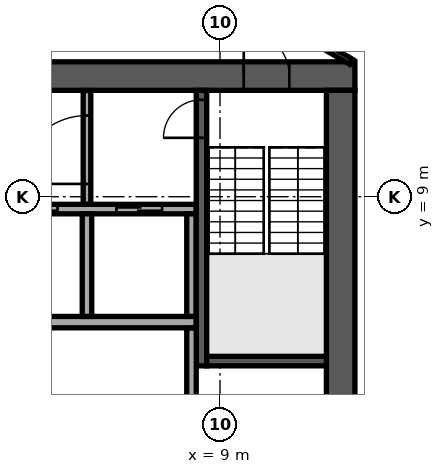
"""IFC4 building model, lengths in metres.
Left out: names, types, materials, properties, quantities, classifications, styles, units other than length and angle.
Written with IfcOpenShell. Run it as: python <this file> out.ifc"""

import sys

from ifc_helpers import new_model, si_unit, direction, frame, frame_2d, origin, place, context, subcontext, project, spatial, rectangle, extrude, element, fill, save


model = new_model("IFC4")
c1 = context("Model", 3, precision=1e-05, world=origin(), true_north=direction((0.0, 1.0)))
c2 = subcontext(c1, "Body", "Model", "MODEL_VIEW")
j1 = project(units=[si_unit("LENGTHUNIT", "METRE"), si_unit("PLANEANGLEUNIT", "RADIAN")], contexts=[c1])
p1 = place(None, origin())
s1 = spatial("IfcSite", under=j1, at=p1, CompositionType="ELEMENT")
p2 = place(p1, origin())
s2 = spatial("IfcBuilding", under=s1, at=p2, CompositionType="ELEMENT")
p3 = place(p2, frame((0.0, 0.0, 262.9)))
s3 = spatial("IfcBuildingStorey", under=s2, at=p3, CompositionType="ELEMENT", Elevation=262.9)
p4 = place(p3, frame((-12.55, 12.175, 0.0), z_axis=(0.0, 0.0, 1.0), x_axis=(1.0, 0.0, 0.0)))
e1 = element("IfcWall", 1, at=p4, inside=s3, PredefinedType="SHEAR", context=c2, shape_type="SweptSolid", body=[
    extrude(rectangle(XDim=25.1, YDim=0.75, at=frame_2d((12.55, 0.0))), origin(), (0.0, 0.0, 1.0), 3.64),
])
p5 = place(p4, frame((11.35, 0.0, 0.0)))
e2 = element("IfcOpeningElement", 2, at=p5, cuts=e1, PredefinedType="OPENING", context=c2, shape_type="SweptSolid", body=[
    extrude(rectangle(XDim=2.4, YDim=2.4, at=frame_2d((1.2, 1.2))), frame((0.0, 0.385, 0.0), z_axis=(0.0, -1.0, 0.0), x_axis=(1.0, 0.0, 0.0)), (0.0, 0.0, 1.0), 0.77),
])
p6 = place(p4, frame((22.175, 0.0, 0.0)))
e3 = element("IfcOpeningElement", 3, at=p6, cuts=e1, PredefinedType="OPENING", context=c2, shape_type="SweptSolid", body=[
    extrude(rectangle(XDim=1.2, YDim=2.1, at=frame_2d((0.6, 1.05))), frame((0.0, 0.385, 0.0), z_axis=(0.0, -1.0, 0.0), x_axis=(1.0, 0.0, 0.0)), (0.0, 0.0, 1.0), 0.77),
])
p7 = place(p4, frame((1.15, 0.0, 0.0)))
e4 = element("IfcOpeningElement", 4, at=p7, cuts=e1, PredefinedType="OPENING", context=c2, shape_type="SweptSolid", body=[
    extrude(rectangle(XDim=1.0, YDim=2.1, at=frame_2d((0.5, 1.05))), frame((0.0, 0.385, 0.0), z_axis=(0.0, -1.0, 0.0), x_axis=(1.0, 0.0, 0.0)), (0.0, 0.0, 1.0), 0.77),
])
p8 = place(p3, frame((12.175, -11.8, 0.0), z_axis=(0.0, 0.0, 1.0), x_axis=(0.0, 1.0, 0.0)))
e5 = element("IfcWall", 5, at=p8, inside=s3, PredefinedType="SHEAR", context=c2, shape_type="SweptSolid", body=[
    extrude(rectangle(XDim=23.6, YDim=0.75, at=frame_2d((11.8, 0.0))), origin(), (0.0, 0.0, 1.0), 3.64),
])
p9 = place(p8, frame((10.6, 0.0, 0.0)))
e6 = element("IfcOpeningElement", 6, at=p9, cuts=e5, PredefinedType="OPENING", context=c2, shape_type="SweptSolid", body=[
    extrude(rectangle(XDim=2.4, YDim=2.4, at=frame_2d((1.2, 1.2))), frame((0.0, 0.385, 0.0), z_axis=(0.0, -1.0, 0.0), x_axis=(1.0, 0.0, 0.0)), (0.0, 0.0, 1.0), 0.77),
])
p10 = place(p3, frame((-8.375, 5.7, 0.0), z_axis=(0.0, 0.0, 1.0), x_axis=(1.0, 0.0, 0.0)))
e7 = element("IfcWall", 7, at=p10, inside=s3, PredefinedType="SOLIDWALL", context=c2, shape_type="SweptSolid", body=[
    extrude(rectangle(XDim=16.75, YDim=0.3, at=frame_2d((8.375, 0.0))), origin(), (0.0, 0.0, 1.0), 3.64),
])
p11 = place(p3, frame((-8.375, 8.675, 0.0), z_axis=(0.0, 0.0, 1.0), x_axis=(1.0, 0.0, 0.0)))
e8 = element("IfcWall", 8, at=p11, inside=s3, PredefinedType="SOLIDWALL", context=c2, shape_type="SweptSolid", body=[
    extrude(rectangle(XDim=16.75, YDim=0.25, at=frame_2d((8.375, 0.0))), origin(), (0.0, 0.0, 1.0), 3.64),
])
p12 = place(p11, frame((0.9, 0.0, 0.0)))
e9 = element("IfcOpeningElement", 9, at=p12, cuts=e8, PredefinedType="OPENING", context=c2, shape_type="SweptSolid", body=[
    extrude(rectangle(XDim=1.2, YDim=2.1, at=frame_2d((0.6, 1.05))), frame((0.0, 0.135, 0.0), z_axis=(0.0, -1.0, 0.0), x_axis=(1.0, 0.0, 0.0)), (0.0, 0.0, 1.0), 0.27),
])
p13 = place(p11, frame((3.65, 0.0, 0.0)))
e10 = element("IfcOpeningElement", 10, at=p13, cuts=e8, PredefinedType="OPENING", context=c2, shape_type="SweptSolid", body=[
    extrude(rectangle(XDim=1.2, YDim=2.1, at=frame_2d((0.6, 1.05))), frame((0.0, 0.135, 0.0), z_axis=(0.0, -1.0, 0.0), x_axis=(1.0, 0.0, 0.0)), (0.0, 0.0, 1.0), 0.27),
])
p14 = place(p11, frame((6.4, 0.0, 0.0)))
e11 = element("IfcOpeningElement", 11, at=p14, cuts=e8, PredefinedType="OPENING", context=c2, shape_type="SweptSolid", body=[
    extrude(rectangle(XDim=1.2, YDim=2.1, at=frame_2d((0.6, 1.05))), frame((0.0, 0.135, 0.0), z_axis=(0.0, -1.0, 0.0), x_axis=(1.0, 0.0, 0.0)), (0.0, 0.0, 1.0), 0.27),
])
p15 = place(p11, frame((9.15, 0.0, 0.0)))
e12 = element("IfcOpeningElement", 12, at=p15, cuts=e8, PredefinedType="OPENING", context=c2, shape_type="SweptSolid", body=[
    extrude(rectangle(XDim=1.2, YDim=2.1, at=frame_2d((0.6, 1.05))), frame((0.0, 0.135, 0.0), z_axis=(0.0, -1.0, 0.0), x_axis=(1.0, 0.0, 0.0)), (0.0, 0.0, 1.0), 0.27),
])
p16 = place(p11, frame((11.9, 0.0, 0.0)))
e13 = element("IfcOpeningElement", 13, at=p16, cuts=e8, PredefinedType="OPENING", context=c2, shape_type="SweptSolid", body=[
    extrude(rectangle(XDim=1.2, YDim=2.1, at=frame_2d((0.6, 1.05))), frame((0.0, 0.135, 0.0), z_axis=(0.0, -1.0, 0.0), x_axis=(1.0, 0.0, 0.0)), (0.0, 0.0, 1.0), 0.27),
])
p17 = place(p11, frame((14.65, 0.0, 0.0)))
e14 = element("IfcOpeningElement", 14, at=p17, cuts=e8, PredefinedType="OPENING", context=c2, shape_type="SweptSolid", body=[
    extrude(rectangle(XDim=1.2, YDim=2.1, at=frame_2d((0.6, 1.05))), frame((0.0, 0.135, 0.0), z_axis=(0.0, -1.0, 0.0), x_axis=(1.0, 0.0, 0.0)), (0.0, 0.0, 1.0), 0.27),
])
for number, where, z_axis, x_axis in (
    (15, (5.5, 5.85, 0.0), (0.0, 0.0, 1.0), (0.0, 1.0, 0.0)),
    (16, (8.25, 5.85, 0.0), (0.0, 0.0, 1.0), (0.0, 1.0, 0.0)),
):
    element("IfcWall", number, at=place(p3, frame(where, z_axis=z_axis, x_axis=x_axis)), inside=s3, PredefinedType="SOLIDWALL", context=c2, shape_type="SweptSolid", body=[
        extrude(rectangle(XDim=2.7, YDim=0.25, at=frame_2d((1.35, 0.0))), origin(), (0.0, 0.0, 1.0), 3.64),
    ])
p18 = place(p3, frame((8.512, 4.55, 0.0), z_axis=(0.0, 0.0, 1.0), x_axis=(0.0, 1.0, 0.0)))
e17 = element("IfcWall", 17, at=p18, inside=s3, PredefinedType="SOLIDWALL", context=c2, shape_type="SweptSolid", body=[
    extrude(rectangle(XDim=7.25, YDim=0.275, at=frame_2d((3.625, 0.0))), origin(), (0.0, 0.0, 1.0), 3.64),
])
p19 = place(p18, frame((6.0, 0.0, 0.0)))
e18 = element("IfcOpeningElement", 18, at=p19, cuts=e17, PredefinedType="OPENING", context=c2, shape_type="SweptSolid", body=[
    extrude(rectangle(XDim=1.0, YDim=2.1, at=frame_2d((0.5, 1.05))), frame((0.0, 0.147, 0.0), z_axis=(0.0, -1.0, 0.0), x_axis=(1.0, 0.0, 0.0)), (0.0, 0.0, 1.0), 0.295),
])
p20 = place(p3, frame((8.65, 4.675, 0.0), z_axis=(0.0, 0.0, 1.0), x_axis=(1.0, 0.0, 0.0)))
e19 = element("IfcWall", 19, at=p20, inside=s3, PredefinedType="SOLIDWALL", context=c2, shape_type="SweptSolid", body=[
    extrude(rectangle(XDim=3.15, YDim=0.25, at=frame_2d((1.575, 0.0))), origin(), (0.0, 0.0, 1.0), 3.64),
])
p21 = place(p3, frame((8.25, 2.855, 0.0), z_axis=(0.0, 0.0, 1.0), x_axis=(0.0, 1.0, 0.0)))
e20 = element("IfcWall", 20, at=p21, inside=s3, PredefinedType="PARTITIONING", context=c2, shape_type="SweptSolid", body=[
    extrude(rectangle(XDim=2.69, YDim=0.25, at=frame_2d((1.345, 0.0))), origin(), (0.0, 0.0, 1.0), 3.64),
])
p22 = place(p3, frame((5.5, 8.805, 0.0), z_axis=(0.0, 0.0, 1.0), x_axis=(0.0, 1.0, 0.0)))
e21 = element("IfcWall", 21, at=p22, inside=s3, PredefinedType="PARTITIONING", context=c2, shape_type="SweptSolid", body=[
    extrude(rectangle(XDim=2.99, YDim=0.2, at=frame_2d((1.495, 0.0))), origin(), (0.0, 0.0, 1.0), 3.64),
])
p23 = place(p22, frame((0.532, 0.0, 0.0)))
e22 = element("IfcOpeningElement", 22, at=p23, cuts=e21, PredefinedType="OPENING", context=c2, shape_type="SweptSolid", body=[
    extrude(rectangle(XDim=1.8, YDim=2.1, at=frame_2d((0.9, 1.05))), frame((0.0, 0.11, 0.0), z_axis=(0.0, -1.0, 0.0), x_axis=(1.0, 0.0, 0.0)), (0.0, 0.0, 1.0), 0.22),
])
p24 = place(p3, frame((8.094, -32.782, 0.0), z_axis=(0.0, 0.0, 1.0), x_axis=(0.499997945818, 0.866026589763, 0.0)))
e23 = element("IfcWall", 23, at=p24, inside=s3, PredefinedType="STANDARD", context=c2, shape_type="SweptSolid", body=[
    extrude(rectangle(XDim=48.686, YDim=0.6, at=frame_2d((24.343, 0.0))), origin(), (0.0, 0.0, 1.0), 3.64),
])
p25 = place(p24, frame((1.213, 0.0, 0.9)))
e24 = element("IfcOpeningElement", 24, at=p25, cuts=e23, PredefinedType="OPENING", context=c2, shape_type="SweptSolid", body=[
    extrude(rectangle(XDim=2.0, YDim=2.1, at=frame_2d((1.0, 1.05))), frame((0.0, 0.31, 0.0), z_axis=(0.0, -1.0, 0.0), x_axis=(1.0, 0.0, 0.0)), (0.0, 0.0, 1.0), 0.62),
])
p26 = place(p24, frame((5.639, 0.0, 0.9)))
e25 = element("IfcOpeningElement", 25, at=p26, cuts=e23, PredefinedType="OPENING", context=c2, shape_type="SweptSolid", body=[
    extrude(rectangle(XDim=2.0, YDim=2.1, at=frame_2d((1.0, 1.05))), frame((0.0, 0.31, 0.0), z_axis=(0.0, -1.0, 0.0), x_axis=(1.0, 0.0, 0.0)), (0.0, 0.0, 1.0), 0.62),
])
p27 = place(p24, frame((10.065, 0.0, 0.9)))
e26 = element("IfcOpeningElement", 26, at=p27, cuts=e23, PredefinedType="OPENING", context=c2, shape_type="SweptSolid", body=[
    extrude(rectangle(XDim=2.0, YDim=2.1, at=frame_2d((1.0, 1.05))), frame((0.0, 0.31, 0.0), z_axis=(0.0, -1.0, 0.0), x_axis=(1.0, 0.0, 0.0)), (0.0, 0.0, 1.0), 0.62),
])
p28 = place(p24, frame((14.491, 0.0, 0.9)))
e27 = element("IfcOpeningElement", 27, at=p28, cuts=e23, PredefinedType="OPENING", context=c2, shape_type="SweptSolid", body=[
    extrude(rectangle(XDim=2.0, YDim=2.1, at=frame_2d((1.0, 1.05))), frame((0.0, 0.31, 0.0), z_axis=(0.0, -1.0, 0.0), x_axis=(1.0, 0.0, 0.0)), (0.0, 0.0, 1.0), 0.62),
])
p29 = place(p24, frame((18.917, 0.0, 0.9)))
e28 = element("IfcOpeningElement", 28, at=p29, cuts=e23, PredefinedType="OPENING", context=c2, shape_type="SweptSolid", body=[
    extrude(rectangle(XDim=2.0, YDim=2.1, at=frame_2d((1.0, 1.05))), frame((0.0, 0.31, 0.0), z_axis=(0.0, -1.0, 0.0), x_axis=(1.0, 0.0, 0.0)), (0.0, 0.0, 1.0), 0.62),
])
p30 = place(p24, frame((23.343, 0.0, 0.9)))
e29 = element("IfcOpeningElement", 29, at=p30, cuts=e23, PredefinedType="OPENING", context=c2, shape_type="SweptSolid", body=[
    extrude(rectangle(XDim=2.0, YDim=2.1, at=frame_2d((1.0, 1.05))), frame((0.0, 0.31, 0.0), z_axis=(0.0, -1.0, 0.0), x_axis=(1.0, 0.0, 0.0)), (0.0, 0.0, 1.0), 0.62),
])
p31 = place(p24, frame((27.769, 0.0, 0.9)))
e30 = element("IfcOpeningElement", 30, at=p31, cuts=e23, PredefinedType="OPENING", context=c2, shape_type="SweptSolid", body=[
    extrude(rectangle(XDim=2.0, YDim=2.1, at=frame_2d((1.0, 1.05))), frame((0.0, 0.31, 0.0), z_axis=(0.0, -1.0, 0.0), x_axis=(1.0, 0.0, 0.0)), (0.0, 0.0, 1.0), 0.62),
])
p32 = place(p24, frame((32.195, 0.0, 0.9)))
e31 = element("IfcOpeningElement", 31, at=p32, cuts=e23, PredefinedType="OPENING", context=c2, shape_type="SweptSolid", body=[
    extrude(rectangle(XDim=2.0, YDim=2.1, at=frame_2d((1.0, 1.05))), frame((0.0, 0.31, 0.0), z_axis=(0.0, -1.0, 0.0), x_axis=(1.0, 0.0, 0.0)), (0.0, 0.0, 1.0), 0.62),
])
p33 = place(p24, frame((36.621, 0.0, 0.9)))
e32 = element("IfcOpeningElement", 32, at=p33, cuts=e23, PredefinedType="OPENING", context=c2, shape_type="SweptSolid", body=[
    extrude(rectangle(XDim=2.0, YDim=2.1, at=frame_2d((1.0, 1.05))), frame((0.0, 0.31, 0.0), z_axis=(0.0, -1.0, 0.0), x_axis=(1.0, 0.0, 0.0)), (0.0, 0.0, 1.0), 0.62),
])
p34 = place(p24, frame((41.047, 0.0, 0.9)))
e33 = element("IfcOpeningElement", 33, at=p34, cuts=e23, PredefinedType="OPENING", context=c2, shape_type="SweptSolid", body=[
    extrude(rectangle(XDim=2.0, YDim=2.1, at=frame_2d((1.0, 1.05))), frame((0.0, 0.31, 0.0), z_axis=(0.0, -1.0, 0.0), x_axis=(1.0, 0.0, 0.0)), (0.0, 0.0, 1.0), 0.62),
])
p35 = place(p24, frame((45.473, 0.0, 0.9)))
e34 = element("IfcOpeningElement", 34, at=p35, cuts=e23, PredefinedType="OPENING", context=c2, shape_type="SweptSolid", body=[
    extrude(rectangle(XDim=2.0, YDim=2.1, at=frame_2d((1.0, 1.05))), frame((0.0, 0.31, 0.0), z_axis=(0.0, -1.0, 0.0), x_axis=(1.0, 0.0, 0.0)), (0.0, 0.0, 1.0), 0.62),
])
p36 = place(p3, frame((-7.247, 26.698, 0.0), z_axis=(0.0, 0.0, 1.0), x_axis=(0.866022442497, -0.500005129065, 0.0)))
e35 = element("IfcWall", 35, at=p36, inside=s3, PredefinedType="PARTITIONING", context=c2, shape_type="SweptSolid", body=[
    extrude(rectangle(XDim=39.325, YDim=0.15, at=frame_2d((19.662, 0.0))), origin(), (0.0, 0.0, 1.0), 3.04),
])
p37 = place(p36, frame((15.654, 0.0, 0.0)))
e36 = element("IfcOpeningElement", 36, at=p37, cuts=e35, PredefinedType="OPENING", context=c2, shape_type="SweptSolid", body=[
    extrude(rectangle(XDim=1.0, YDim=2.1, at=frame_2d((0.5, 1.05))), frame((0.0, 0.085, 0.0), z_axis=(0.0, -1.0, 0.0), x_axis=(1.0, 0.0, 0.0)), (0.0, 0.0, 1.0), 0.17),
])
p38 = place(p36, frame((23.442, 0.0, 0.0)))
e37 = element("IfcOpeningElement", 37, at=p38, cuts=e35, PredefinedType="OPENING", context=c2, shape_type="SweptSolid", body=[
    extrude(rectangle(XDim=1.0, YDim=2.1, at=frame_2d((0.5, 1.05))), frame((0.0, 0.085, 0.0), z_axis=(0.0, -1.0, 0.0), x_axis=(1.0, 0.0, 0.0)), (0.0, 0.0, 1.0), 0.17),
])
p39 = place(p36, frame((31.841, 0.0, 0.0)))
e38 = element("IfcOpeningElement", 38, at=p39, cuts=e35, PredefinedType="OPENING", context=c2, shape_type="SweptSolid", body=[
    extrude(rectangle(XDim=1.0, YDim=2.1, at=frame_2d((0.5, 1.05))), frame((0.0, 0.085, 0.0), z_axis=(0.0, -1.0, 0.0), x_axis=(1.0, 0.0, 0.0)), (0.0, 0.0, 1.0), 0.17),
])
p40 = place(p36, frame((36.955, 0.0, 0.0)))
e39 = element("IfcOpeningElement", 39, at=p40, cuts=e35, PredefinedType="OPENING", context=c2, shape_type="SweptSolid", body=[
    extrude(rectangle(XDim=1.0, YDim=2.1, at=frame_2d((0.5, 1.05))), frame((0.0, 0.085, 0.0), z_axis=(0.0, -1.0, 0.0), x_axis=(1.0, 0.0, 0.0)), (0.0, 0.0, 1.0), 0.17),
])
p41 = place(p3, frame((2.627, 12.55, 0.0), z_axis=(0.0, 0.0, 1.0), x_axis=(0.50013524008, 0.865947308807, 0.0)))
e40 = element("IfcWall", 40, at=p41, inside=s3, PredefinedType="PARTITIONING", context=c2, shape_type="SweptSolid", body=[
    extrude(rectangle(XDim=4.915, YDim=0.15, at=frame_2d((2.458, 0.0))), origin(), (0.0, 0.0, 1.0), 3.24),
])
p42 = place(p3, frame((5.15, 16.769, 0.0), z_axis=(0.0, 0.0, 1.0), x_axis=(0.866010168016, -0.500026388196, 0.0)))
e41 = element("IfcWall", 41, at=p42, inside=s3, PredefinedType="PARTITIONING", context=c2, shape_type="SweptSolid", body=[
    extrude(rectangle(XDim=8.437, YDim=0.15, at=frame_2d((4.218, 0.0))), origin(), (0.0, 0.0, 1.0), 3.24),
])
p43 = place(p42, frame((3.3, 0.0, 0.0)))
e42 = element("IfcOpeningElement", 42, at=p43, cuts=e41, PredefinedType="OPENING", context=c2, shape_type="SweptSolid", body=[
    extrude(rectangle(XDim=1.0, YDim=2.1, at=frame_2d((0.5, 1.05))), frame((0.0, 0.085, 0.0), z_axis=(0.0, -1.0, 0.0), x_axis=(1.0, 0.0, 0.0)), (0.0, 0.0, 1.0), 0.17),
])
p44 = place(p6, origin())
e43 = element("IfcDoor", 43, at=p44, inside=s3, OperationType="SINGLE_SWING_LEFT", PredefinedType="DOOR", context=c2, shape_type="SweptSolid", body=[
    extrude(rectangle(XDim=1.2, YDim=2.1, at=frame_2d((0.6, 1.05))), frame((0.0, 0.025, 0.0), z_axis=(0.0, -1.0, 0.0), x_axis=(1.0, 0.0, 0.0)), (0.0, 0.0, 1.0), 0.05),
])
fill(e3, e43)
p45 = place(p16, origin())
e44 = element("IfcDoor", 44, at=p45, inside=s3, OperationType="DOUBLE_DOOR_SLIDING", PredefinedType="DOOR", context=c2, shape_type="SweptSolid", body=[
    extrude(rectangle(XDim=1.2, YDim=2.1, at=frame_2d((0.6, 1.05))), frame((0.0, 0.025, 0.0), z_axis=(0.0, -1.0, 0.0), x_axis=(1.0, 0.0, 0.0)), (0.0, 0.0, 1.0), 0.05),
])
fill(e13, e44)
p46 = place(p17, origin())
e45 = element("IfcDoor", 45, at=p46, inside=s3, OperationType="DOUBLE_DOOR_SLIDING", PredefinedType="DOOR", context=c2, shape_type="SweptSolid", body=[
    extrude(rectangle(XDim=1.2, YDim=2.1, at=frame_2d((0.6, 1.05))), frame((0.0, 0.025, 0.0), z_axis=(0.0, -1.0, 0.0), x_axis=(1.0, 0.0, 0.0)), (0.0, 0.0, 1.0), 0.05),
])
fill(e14, e45)
p47 = place(p19, origin())
e46 = element("IfcDoor", 46, at=p47, inside=s3, OperationType="SINGLE_SWING_LEFT", PredefinedType="DOOR", context=c2, shape_type="SweptSolid", body=[
    extrude(rectangle(XDim=1.0, YDim=2.1, at=frame_2d((0.5, 1.05))), frame((0.0, 0.025, 0.0), z_axis=(0.0, -1.0, 0.0), x_axis=(1.0, 0.0, 0.0)), (0.0, 0.0, 1.0), 0.05),
])
fill(e18, e46)
p48 = place(p23, origin())
e47 = element("IfcDoor", 47, at=p48, inside=s3, OperationType="SINGLE_SWING_LEFT", PredefinedType="DOOR", context=c2, shape_type="SweptSolid", body=[
    extrude(rectangle(XDim=1.8, YDim=2.1, at=frame_2d((0.9, 1.05))), frame((0.0, 0.025, 0.0), z_axis=(0.0, -1.0, 0.0), x_axis=(1.0, 0.0, 0.0)), (0.0, 0.0, 1.0), 0.05),
])
fill(e22, e47)
save(model, sys.argv[1])
